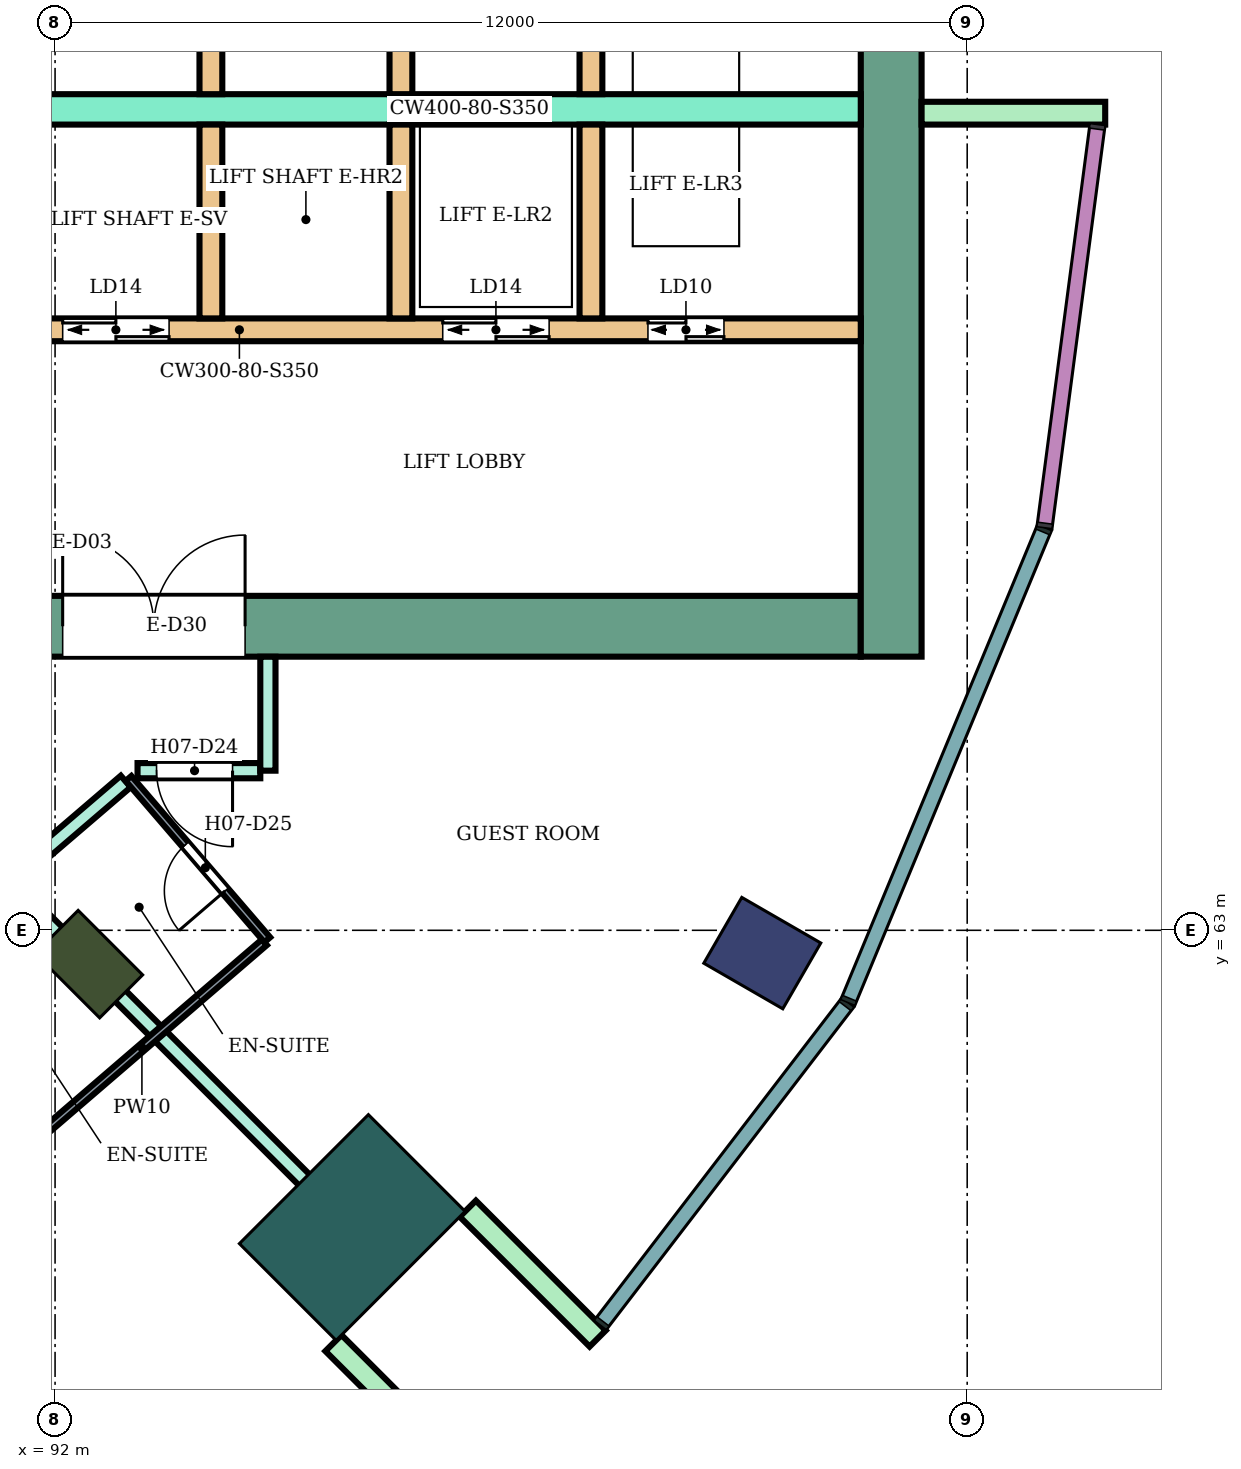
"""IFC4 building model, lengths in metres.
Left out: names, types, materials, properties, quantities, classifications, styles, units other than length and angle.
Written with IfcOpenShell. Run it as: python <this file> out.ifc"""

import sys

from ifc_helpers import new_model, si_unit, direction, frame, frame_2d, origin, origin_2d, place, context, subcontext, project, spatial, rectangle, extrude, element, fill, save


model = new_model("IFC4")
c1 = context("Model", 3, precision=1e-05, world=origin(), true_north=direction((0.0, 1.0)))
c2 = subcontext(c1, "Body", "Model", "MODEL_VIEW")
j1 = project(units=[si_unit("LENGTHUNIT", "METRE"), si_unit("PLANEANGLEUNIT", "RADIAN")], contexts=[c1])
p1 = place(None, origin())
s1 = spatial("IfcSite", under=j1, at=p1, CompositionType="ELEMENT")
p2 = place(p1, origin())
s2 = spatial("IfcBuilding", under=s1, at=p2, CompositionType="ELEMENT")
p3 = place(p2, frame((0.0, 0.0, 105.2)))
s3 = spatial("IfcBuildingStorey", under=s2, at=p3, CompositionType="ELEMENT", Elevation=105.2)
p4 = place(p3, frame((101.304, 62.7, 0.0), z_axis=(0.0, 0.0, 1.0), x_axis=(0.866025403784, -0.5, 0.0)))
e1 = element("IfcColumn", 1, at=p4, inside=s3, PredefinedType="COLUMN", context=c2, shape_type="SweptSolid", body=[
    extrude(rectangle(XDim=1.2, YDim=1.0, at=origin_2d()), origin(), (0.0, 0.0, 1.0), 3.8),
])
p5 = place(p3, frame((92.445, 62.555, 0.0), z_axis=(0.0, 0.0, 1.0), x_axis=(0.707106781187, -0.707106781187, 0.0)))
e2 = element("IfcColumn", 2, at=p5, inside=s3, PredefinedType="COLUMN", context=c2, shape_type="SweptSolid", body=[
    extrude(rectangle(XDim=1.2, YDim=0.8, at=origin_2d()), origin(), (0.0, 0.0, 1.0), 3.8),
])
p6 = place(p3, frame((95.91, 59.09, 0.0), z_axis=(0.0, 0.0, 1.0), x_axis=(0.707106781187, -0.707106781187, 0.0)))
e3 = element("IfcColumn", 3, at=p6, inside=s3, PredefinedType="COLUMN", context=c2, shape_type="SweptSolid", body=[
    extrude(rectangle(XDim=1.8, YDim=2.4, at=origin_2d()), origin(), (0.0, 0.0, 1.0), 3.8),
])
p7 = place(p3, frame((87.9, 67.0, 0.0), z_axis=(0.0, 0.0, 1.0), x_axis=(1.0, 0.0, 0.0)))
e4 = element("IfcWall", 4, at=p7, inside=s3, PredefinedType="SHEAR", context=c2, shape_type="SweptSolid", body=[
    extrude(rectangle(XDim=14.7, YDim=0.8, at=frame_2d((7.35, 0.0))), origin(), (0.0, 0.0, 1.0), 3.45),
])
p8 = place(p7, frame((4.2, 0.0, 0.0)))
e5 = element("IfcOpeningElement", 5, at=p8, cuts=e4, PredefinedType="OPENING", context=c2, shape_type="SweptSolid", body=[
    extrude(rectangle(XDim=2.4, YDim=2.4, at=frame_2d((1.2, 1.2))), frame((0.0, 0.41, 0.0), z_axis=(0.0, -1.0, 0.0), x_axis=(1.0, 0.0, 0.0)), (0.0, 0.0, 1.0), 0.82),
])
p9 = place(p3, frame((103.0, 66.6, 0.0), z_axis=(0.0, 0.0, 1.0), x_axis=(0.0, 1.0, 0.0)))
e6 = element("IfcWall", 6, at=p9, inside=s3, PredefinedType="SHEAR", context=c2, shape_type="SweptSolid", body=[
    extrude(rectangle(XDim=16.8, YDim=0.8, at=frame_2d((8.4, 0.0))), origin(), (0.0, 0.0, 1.0), 3.45),
])
p10 = place(p3, frame((91.7, 73.8, 0.0), z_axis=(0.0, 0.0, 1.0), x_axis=(1.0, 0.0, 0.0)))
e7 = element("IfcWall", 7, at=p10, inside=s3, PredefinedType="SHEAR", context=c2, shape_type="SweptSolid", body=[
    extrude(rectangle(XDim=10.9, YDim=0.4, at=frame_2d((5.45, 0.0))), origin(), (0.0, 0.0, 1.0), 3.45),
])
p11 = place(p3, frame((91.7, 70.9, 0.0), z_axis=(0.0, 0.0, 1.0), x_axis=(1.0, 0.0, 0.0)))
e8 = element("IfcWall", 8, at=p11, inside=s3, PredefinedType="SHEAR", context=c2, shape_type="SweptSolid", body=[
    extrude(rectangle(XDim=10.9, YDim=0.3, at=frame_2d((5.45, 0.0))), origin(), (0.0, 0.0, 1.0), 3.45),
])
p12 = place(p11, frame((0.4, 0.0, 0.0)))
e9 = element("IfcOpeningElement", 9, at=p12, cuts=e8, PredefinedType="OPENING", context=c2, shape_type="SweptSolid", body=[
    extrude(rectangle(XDim=1.4, YDim=2.1, at=frame_2d((0.7, 1.05))), frame((0.0, 0.16, 0.0), z_axis=(0.0, -1.0, 0.0), x_axis=(1.0, 0.0, 0.0)), (0.0, 0.0, 1.0), 0.32),
])
p13 = place(p11, frame((5.4, 0.0, 0.0)))
e10 = element("IfcOpeningElement", 10, at=p13, cuts=e8, PredefinedType="OPENING", context=c2, shape_type="SweptSolid", body=[
    extrude(rectangle(XDim=1.4, YDim=2.1, at=frame_2d((0.7, 1.05))), frame((0.0, 0.16, 0.0), z_axis=(0.0, -1.0, 0.0), x_axis=(1.0, 0.0, 0.0)), (0.0, 0.0, 1.0), 0.32),
])
p14 = place(p11, frame((8.1, 0.0, 0.0)))
e11 = element("IfcOpeningElement", 11, at=p14, cuts=e8, PredefinedType="OPENING", context=c2, shape_type="SweptSolid", body=[
    extrude(rectangle(XDim=1.0, YDim=2.1, at=frame_2d((0.5, 1.05))), frame((0.0, 0.16, 0.0), z_axis=(0.0, -1.0, 0.0), x_axis=(1.0, 0.0, 0.0)), (0.0, 0.0, 1.0), 0.32),
])
for number, where, z_axis, x_axis in (
    (12, (94.05, 74.0, 0.0), (0.0, 0.0, 1.0), (0.0, 1.0, 0.0)),
    (13, (96.55, 74.0, 0.0), (0.0, 0.0, 1.0), (0.0, 1.0, 0.0)),
    (14, (99.05, 74.0, 0.0), (0.0, 0.0, 1.0), (0.0, 1.0, 0.0)),
    (15, (94.05, 71.05, 0.0), (0.0, 0.0, 1.0), (0.0, 1.0, 0.0)),
    (16, (96.55, 71.05, 0.0), (0.0, 0.0, 1.0), (0.0, 1.0, 0.0)),
    (17, (99.05, 71.05, 0.0), (0.0, 0.0, 1.0), (0.0, 1.0, 0.0)),
):
    element("IfcWall", number, at=place(p3, frame(where, z_axis=z_axis, x_axis=x_axis)), inside=s3, PredefinedType="SHEAR", context=c2, shape_type="SweptSolid", body=[
        extrude(rectangle(XDim=2.55, YDim=0.3, at=frame_2d((1.275, 0.0))), origin(), (0.0, 0.0, 1.0), 3.45),
    ])
for number, where, z_axis, x_axis in (
    (18, (103.4, 73.75, 0.0), (0.0, 0.0, 1.0), (1.0, 0.0, 0.0)),
    (19, (95.662, 57.57, 0.0), (0.0, 0.0, 1.0), (0.707, -0.707, 0.0)),
    (20, (97.43, 59.338, 0.0), (0.0, 0.0, 1.0), (0.707, -0.707, 0.0)),
):
    element("IfcWall", number, at=place(p3, frame(where, z_axis=z_axis, x_axis=x_axis)), inside=s3, PredefinedType="NOTDEFINED", context=c2, shape_type="SweptSolid", body=[
        extrude(rectangle(XDim=2.416, YDim=0.3, at=frame_2d((1.208, 0.0))), origin(), (0.0, 0.0, 1.0), 3.8),
    ])
p15 = place(p3, frame((88.119, 60.835, 0.0), z_axis=(0.0, 0.0, 1.0), x_axis=(0.759278362444, 0.650765985838, 0.0)))
e21 = element("IfcWall", 21, at=p15, inside=s3, PredefinedType="PARTITIONING", context=c2, shape_type="SweptSolid", body=[
    extrude(rectangle(XDim=6.336, YDim=0.2, at=frame_2d((3.168, 0.0))), origin(), (0.0, 0.0, 1.0), 3.35),
])
p16 = place(p3, frame((91.449, 63.547, 0.0), z_axis=(0.0, 0.0, 1.0), x_axis=(0.706984798626, -0.707228742708, 0.0)))
e22 = element("IfcWall", 22, at=p16, inside=s3, PredefinedType="PARTITIONING", context=c2, shape_type="SweptSolid", body=[
    extrude(rectangle(XDim=7.006, YDim=0.2, at=frame_2d((3.503, 0.0))), origin(), (0.0, 0.0, 1.0), 3.35),
])
p17 = place(p3, frame((93.085, 65.1, 0.0), z_axis=(0.0, 0.0, 1.0), x_axis=(1.0, 0.0, 0.0)))
e23 = element("IfcWall", 23, at=p17, inside=s3, PredefinedType="PARTITIONING", context=c2, shape_type="SweptSolid", body=[
    extrude(rectangle(XDim=1.615, YDim=0.2, at=frame_2d((0.808, 0.0))), origin(), (0.0, 0.0, 1.0), 3.35),
])
p18 = place(p17, frame((0.25, 0.0, 0.0)))
e24 = element("IfcOpeningElement", 24, at=p18, cuts=e23, PredefinedType="OPENING", context=c2, shape_type="SweptSolid", body=[
    extrude(rectangle(XDim=1.0, YDim=2.1, at=frame_2d((0.5, 1.05))), frame((0.0, 0.11, 0.0), z_axis=(0.0, -1.0, 0.0), x_axis=(1.0, 0.0, 0.0)), (0.0, 0.0, 1.0), 0.22),
])
p19 = place(p3, frame((94.8, 65.1, 0.0), z_axis=(0.0, 0.0, 1.0), x_axis=(0.0, 1.0, 0.0)))
e25 = element("IfcWall", 25, at=p19, inside=s3, PredefinedType="PARTITIONING", context=c2, shape_type="SweptSolid", body=[
    extrude(rectangle(XDim=1.499, YDim=0.2, at=frame_2d((0.75, 0.0))), origin(), (0.0, 0.0, 1.0), 3.35),
])
p20 = place(p3, frame((91.531, 60.07, 0.0), z_axis=(0.0, 0.0, 1.0), x_axis=(0.758043227135, 0.652204312922, 0.0)))
e26 = element("IfcWall", 26, at=p20, inside=s3, PredefinedType="PARTITIONING", context=c2, shape_type="SweptSolid", body=[
    extrude(rectangle(XDim=4.251, YDim=0.1, at=frame_2d((2.125, 0.0))), origin(), (0.0, 0.0, 1.0), 3.35),
])
p21 = place(p3, frame((92.966, 64.998, 0.0), z_axis=(0.0, 0.0, 1.0), x_axis=(0.65205430601, -0.758172264076, 0.0)))
e27 = element("IfcWall", 27, at=p21, inside=s3, PredefinedType="PARTITIONING", context=c2, shape_type="SweptSolid", body=[
    extrude(rectangle(XDim=2.8, YDim=0.1, at=frame_2d((1.4, 0.0))), origin(), (0.0, 0.0, 1.0), 3.35),
])
p22 = place(p21, frame((1.15, 0.0, 0.0)))
e28 = element("IfcOpeningElement", 28, at=p22, cuts=e27, PredefinedType="OPENING", context=c2, shape_type="SweptSolid", body=[
    extrude(rectangle(XDim=0.8, YDim=2.1, at=frame_2d((0.4, 1.05))), frame((0.0, 0.06, 0.0), z_axis=(0.0, -1.0, 0.0), x_axis=(1.0, 0.0, 0.0)), (0.0, 0.0, 1.0), 0.12),
])
p23 = place(p18, frame((1.0, 0.0, 0.0), z_axis=(0.0, 0.0, 1.0), x_axis=(-1.0, 0.0, 0.0)))
e29 = element("IfcDoor", 29, at=p23, inside=s3, OperationType="SINGLE_SWING_LEFT", PredefinedType="DOOR", context=c2, shape_type="SweptSolid", body=[
    extrude(rectangle(XDim=1.0, YDim=2.1, at=frame_2d((0.5, 1.05))), frame((0.0, 0.025, 0.0), z_axis=(0.0, -1.0, 0.0), x_axis=(1.0, 0.0, 0.0)), (0.0, 0.0, 1.0), 0.05),
])
fill(e24, e29)
p24 = place(p22, frame((0.8, 0.0, 0.0), z_axis=(0.0, 0.0, 1.0), x_axis=(-1.0, 0.0, 0.0)))
e30 = element("IfcDoor", 30, at=p24, inside=s3, OperationType="SINGLE_SWING_LEFT", PredefinedType="DOOR", context=c2, shape_type="SweptSolid", body=[
    extrude(rectangle(XDim=0.8, YDim=2.1, at=frame_2d((0.4, 1.05))), frame((0.0, 0.025, 0.0), z_axis=(0.0, -1.0, 0.0), x_axis=(1.0, 0.0, 0.0)), (0.0, 0.0, 1.0), 0.05),
])
fill(e28, e30)
p25 = place(p12, origin())
e31 = element("IfcDoor", 31, at=p25, inside=s3, OperationType="DOUBLE_DOOR_SLIDING", PredefinedType="DOOR", context=c2, shape_type="SweptSolid", body=[
    extrude(rectangle(XDim=1.4, YDim=2.1, at=frame_2d((0.7, 1.05))), frame((0.0, 0.025, 0.0), z_axis=(0.0, -1.0, 0.0), x_axis=(1.0, 0.0, 0.0)), (0.0, 0.0, 1.0), 0.05),
])
fill(e9, e31)
p26 = place(p13, origin())
e32 = element("IfcDoor", 32, at=p26, inside=s3, OperationType="DOUBLE_DOOR_SLIDING", PredefinedType="DOOR", context=c2, shape_type="SweptSolid", body=[
    extrude(rectangle(XDim=1.4, YDim=2.1, at=frame_2d((0.7, 1.05))), frame((0.0, 0.025, 0.0), z_axis=(0.0, -1.0, 0.0), x_axis=(1.0, 0.0, 0.0)), (0.0, 0.0, 1.0), 0.05),
])
fill(e10, e32)
p27 = place(p14, origin())
e33 = element("IfcDoor", 33, at=p27, inside=s3, OperationType="DOUBLE_DOOR_SLIDING", PredefinedType="DOOR", context=c2, shape_type="SweptSolid", body=[
    extrude(rectangle(XDim=1.0, YDim=2.1, at=frame_2d((0.5, 1.05))), frame((0.0, 0.025, 0.0), z_axis=(0.0, -1.0, 0.0), x_axis=(1.0, 0.0, 0.0)), (0.0, 0.0, 1.0), 0.05),
])
fill(e11, e33)
p28 = place(p8, origin())
e34 = element("IfcDoor", 34, at=p28, inside=s3, OperationType="DOUBLE_DOOR_SINGLE_SWING", PredefinedType="DOOR", context=c2, shape_type="SweptSolid", body=[
    extrude(rectangle(XDim=2.4, YDim=2.4, at=frame_2d((1.2, 1.2))), frame((0.0, 0.025, 0.0), z_axis=(0.0, -1.0, 0.0), x_axis=(1.0, 0.0, 0.0)), (0.0, 0.0, 1.0), 0.05),
])
fill(e5, e34)
save(model, sys.argv[1])
